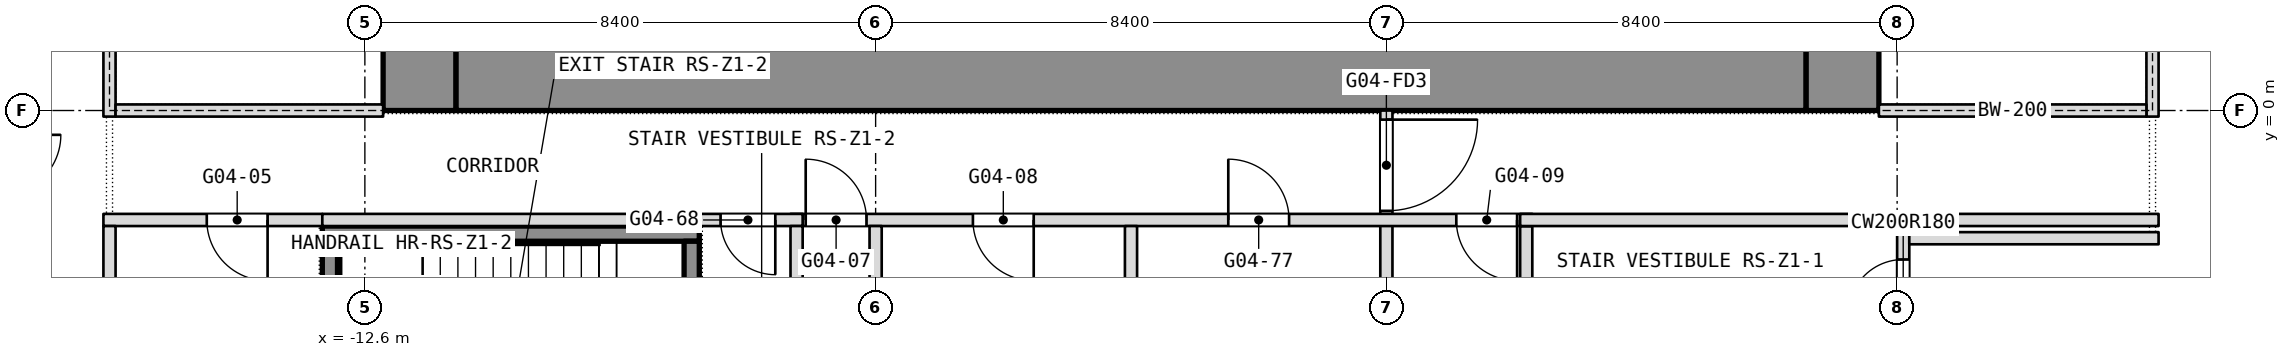
"""IFC4 building model, lengths in metres.
Left out: names, types, materials, properties, quantities, classifications, styles, units other than length and angle.
Written with IfcOpenShell. Run it as: python <this file> out.ifc"""

import sys

from ifc_helpers import new_model, si_unit, direction, frame, frame_2d, origin, place, context, subcontext, project, spatial, rectangle, extrude, element, fill, save


model = new_model("IFC4")
c1 = context("Model", 3, precision=1e-05, world=origin(), true_north=direction((0.0, 1.0)))
c2 = subcontext(c1, "Body", "Model", "MODEL_VIEW")
j1 = project(units=[si_unit("LENGTHUNIT", "METRE"), si_unit("PLANEANGLEUNIT", "RADIAN")], contexts=[c1])
p1 = place(None, origin())
s1 = spatial("IfcSite", under=j1, at=p1, CompositionType="ELEMENT")
p2 = place(p1, origin())
s2 = spatial("IfcBuilding", under=s1, at=p2, CompositionType="ELEMENT")
p3 = place(p2, frame((0.0, 0.0, 58.1)))
s3 = spatial("IfcBuildingStorey", under=s2, at=p3, CompositionType="ELEMENT", Elevation=58.1)
p4 = place(p3, frame((11.7, 0.0, 0.0), z_axis=(0.0, 0.0, 1.0), x_axis=(0.0, 1.0, 0.0)))
e1 = element("IfcWall", 1, at=p4, inside=s3, PredefinedType="SHEAR", context=c2, shape_type="SweptSolid", body=[
    extrude(rectangle(XDim=16.8, YDim=1.2, at=frame_2d((8.4, 0.0))), origin(), (0.0, 0.0, 1.0), 3.6),
])
p5 = place(p4, frame((1.762, 0.0, 0.0)))
e2 = element("IfcOpeningElement", 2, at=p5, cuts=e1, PredefinedType="OPENING", context=c2, shape_type="SweptSolid", body=[
    extrude(rectangle(XDim=0.9, YDim=2.1, at=frame_2d((0.45, 1.05))), frame((0.0, 0.6, 0.0), z_axis=(0.0, -1.0, 0.0), x_axis=(1.0, 0.0, 0.0)), (0.0, 0.0, 1.0), 1.2),
])
p6 = place(p4, frame((4.387, 0.0, 0.0)))
e3 = element("IfcOpeningElement", 3, at=p6, cuts=e1, PredefinedType="OPENING", context=c2, shape_type="SweptSolid", body=[
    extrude(rectangle(XDim=0.9, YDim=2.1, at=frame_2d((0.45, 1.05))), frame((0.0, 0.6, 0.0), z_axis=(0.0, -1.0, 0.0), x_axis=(1.0, 0.0, 0.0)), (0.0, 0.0, 1.0), 1.2),
])
p7 = place(p4, frame((6.825, 0.0, 0.0)))
e4 = element("IfcOpeningElement", 4, at=p7, cuts=e1, PredefinedType="OPENING", context=c2, shape_type="SweptSolid", body=[
    extrude(rectangle(XDim=1.2, YDim=2.1, at=frame_2d((0.6, 1.05))), frame((0.0, 0.6, 0.0), z_axis=(0.0, -1.0, 0.0), x_axis=(1.0, 0.0, 0.0)), (0.0, 0.0, 1.0), 1.2),
])
p8 = place(p4, frame((14.137, 0.0, 0.0)))
e5 = element("IfcOpeningElement", 5, at=p8, cuts=e1, PredefinedType="OPENING", context=c2, shape_type="SweptSolid", body=[
    extrude(rectangle(XDim=0.9, YDim=2.1, at=frame_2d((0.45, 1.05))), frame((0.0, 0.6, 0.0), z_axis=(0.0, -1.0, 0.0), x_axis=(1.0, 0.0, 0.0)), (0.0, 0.0, 1.0), 1.2),
])
p9 = place(p4, frame((11.512, 0.0, 0.0)))
e6 = element("IfcOpeningElement", 6, at=p9, cuts=e1, PredefinedType="OPENING", context=c2, shape_type="SweptSolid", body=[
    extrude(rectangle(XDim=0.9, YDim=2.1, at=frame_2d((0.45, 1.05))), frame((0.0, 0.6, 0.0), z_axis=(0.0, -1.0, 0.0), x_axis=(1.0, 0.0, 0.0)), (0.0, 0.0, 1.0), 1.2),
])
p10 = place(p4, frame((8.775, 0.0, 0.0)))
e7 = element("IfcOpeningElement", 7, at=p10, cuts=e1, PredefinedType="OPENING", context=c2, shape_type="SweptSolid", body=[
    extrude(rectangle(XDim=1.2, YDim=2.1, at=frame_2d((0.6, 1.05))), frame((0.0, 0.6, 0.0), z_axis=(0.0, -1.0, 0.0), x_axis=(1.0, 0.0, 0.0)), (0.0, 0.0, 1.0), 1.2),
])
p11 = place(p3, frame((-11.7, 0.0, 0.0), z_axis=(0.0, 0.0, 1.0), x_axis=(0.0, 1.0, 0.0)))
e8 = element("IfcWall", 8, at=p11, inside=s3, PredefinedType="SHEAR", context=c2, shape_type="SweptSolid", body=[
    extrude(rectangle(XDim=16.8, YDim=1.2, at=frame_2d((8.4, 0.0))), origin(), (0.0, 0.0, 1.0), 3.6),
])
p12 = place(p11, frame((2.3, 0.0, 0.0)))
e9 = element("IfcOpeningElement", 9, at=p12, cuts=e8, PredefinedType="OPENING", context=c2, shape_type="SweptSolid", body=[
    extrude(rectangle(XDim=1.1, YDim=2.1, at=frame_2d((0.55, 1.05))), frame((0.0, 0.6, 0.0), z_axis=(0.0, -1.0, 0.0), x_axis=(1.0, 0.0, 0.0)), (0.0, 0.0, 1.0), 1.2),
])
p13 = place(p11, frame((4.85, 0.0, 0.0)))
e10 = element("IfcOpeningElement", 10, at=p13, cuts=e8, PredefinedType="OPENING", context=c2, shape_type="SweptSolid", body=[
    extrude(rectangle(XDim=1.1, YDim=2.1, at=frame_2d((0.55, 1.05))), frame((0.0, 0.6, 0.0), z_axis=(0.0, -1.0, 0.0), x_axis=(1.0, 0.0, 0.0)), (0.0, 0.0, 1.0), 1.2),
])
p14 = place(p11, frame((6.825, 0.0, 0.0)))
e11 = element("IfcOpeningElement", 11, at=p14, cuts=e8, PredefinedType="OPENING", context=c2, shape_type="SweptSolid", body=[
    extrude(rectangle(XDim=1.2, YDim=2.1, at=frame_2d((0.6, 1.05))), frame((0.0, 0.6, 0.0), z_axis=(0.0, -1.0, 0.0), x_axis=(1.0, 0.0, 0.0)), (0.0, 0.0, 1.0), 1.2),
])
p15 = place(p11, frame((13.4, 0.0, 0.0)))
e12 = element("IfcOpeningElement", 12, at=p15, cuts=e8, PredefinedType="OPENING", context=c2, shape_type="SweptSolid", body=[
    extrude(rectangle(XDim=1.1, YDim=2.1, at=frame_2d((0.55, 1.05))), frame((0.0, 0.6, 0.0), z_axis=(0.0, -1.0, 0.0), x_axis=(1.0, 0.0, 0.0)), (0.0, 0.0, 1.0), 1.2),
])
p16 = place(p11, frame((10.85, 0.0, 0.0)))
e13 = element("IfcOpeningElement", 13, at=p16, cuts=e8, PredefinedType="OPENING", context=c2, shape_type="SweptSolid", body=[
    extrude(rectangle(XDim=1.1, YDim=2.1, at=frame_2d((0.55, 1.05))), frame((0.0, 0.6, 0.0), z_axis=(0.0, -1.0, 0.0), x_axis=(1.0, 0.0, 0.0)), (0.0, 0.0, 1.0), 1.2),
])
p17 = place(p11, frame((8.775, 0.0, 0.0)))
e14 = element("IfcOpeningElement", 14, at=p17, cuts=e8, PredefinedType="OPENING", context=c2, shape_type="SweptSolid", body=[
    extrude(rectangle(XDim=1.2, YDim=2.1, at=frame_2d((0.6, 1.05))), frame((0.0, 0.6, 0.0), z_axis=(0.0, -1.0, 0.0), x_axis=(1.0, 0.0, 0.0)), (0.0, 0.0, 1.0), 1.2),
])
p18 = place(p3, frame((-11.1, 0.6, 0.0), z_axis=(0.0, 0.0, 1.0), x_axis=(1.0, 0.0, 0.0)))
e15 = element("IfcWall", 15, at=p18, inside=s3, PredefinedType="SHEAR", context=c2, shape_type="SweptSolid", body=[
    extrude(rectangle(XDim=22.2, YDim=1.2, at=frame_2d((11.1, 0.0))), origin(), (0.0, 0.0, 1.0), 3.6),
])
p19 = place(p3, frame((12.7, -3.7, 0.0), z_axis=(0.0, 0.0, 1.0), x_axis=(0.0, 1.0, 0.0)))
e16 = element("IfcWall", 16, at=p19, inside=s3, PredefinedType="PARTITIONING", context=c2, shape_type="SweptSolid", body=[
    extrude(rectangle(XDim=1.7, YDim=0.2, at=frame_2d((0.85, 0.0))), origin(), (0.0, 0.0, 1.0), 3.34),
])
p20 = place(p19, frame((0.35, 0.0, 0.0)))
e17 = element("IfcOpeningElement", 17, at=p20, cuts=e16, PredefinedType="OPENING", context=c2, shape_type="SweptSolid", body=[
    extrude(rectangle(XDim=0.9, YDim=2.1, at=frame_2d((0.45, 1.05))), frame((0.0, 0.1, 0.0), z_axis=(0.0, -1.0, 0.0), x_axis=(1.0, 0.0, 0.0)), (0.0, 0.0, 1.0), 0.2),
])
p21 = place(p3, frame((6.5, -3.7, 0.0), z_axis=(0.0, 0.0, 1.0), x_axis=(0.0, 1.0, 0.0)))
e18 = element("IfcWall", 18, at=p21, inside=s3, PredefinedType="PARTITIONING", context=c2, shape_type="SweptSolid", body=[
    extrude(rectangle(XDim=1.8, YDim=0.2, at=frame_2d((0.9, 0.0))), origin(), (0.0, 0.0, 1.0), 3.34),
])
p22 = place(p3, frame((4.2, -12.7, 0.0), z_axis=(0.0, 0.0, 1.0), x_axis=(0.0, 1.0, 0.0)))
e19 = element("IfcWall", 19, at=p22, inside=s3, PredefinedType="PARTITIONING", context=c2, shape_type="SweptSolid", body=[
    extrude(rectangle(XDim=12.7, YDim=0.2, at=frame_2d((6.35, 0.0))), origin(), (0.0, 0.0, 1.0), 3.34),
])
p23 = place(p22, frame((11.05, 0.0, 0.0)))
e20 = element("IfcOpeningElement", 20, at=p23, cuts=e19, PredefinedType="OPENING", context=c2, shape_type="SweptSolid", body=[
    extrude(rectangle(XDim=1.5, YDim=2.1, at=frame_2d((0.75, 1.05))), frame((0.0, 0.1, 0.0), z_axis=(0.0, -1.0, 0.0), x_axis=(1.0, 0.0, 0.0)), (0.0, 0.0, 1.0), 0.2),
])
p24 = place(p22, frame((0.25, 0.0, 0.0)))
e21 = element("IfcOpeningElement", 21, at=p24, cuts=e19, PredefinedType="OPENING", context=c2, shape_type="SweptSolid", body=[
    extrude(rectangle(XDim=1.5, YDim=2.1, at=frame_2d((0.75, 1.05))), frame((0.0, 0.1, 0.0), z_axis=(0.0, -1.0, 0.0), x_axis=(1.0, 0.0, 0.0)), (0.0, 0.0, 1.0), 0.2),
])
p25 = place(p3, frame((12.8, -2.1, 0.0), z_axis=(0.0, 0.0, 1.0), x_axis=(1.0, 0.0, 0.0)))
e22 = element("IfcWall", 22, at=p25, inside=s3, PredefinedType="PARTITIONING", context=c2, shape_type="SweptSolid", body=[
    extrude(rectangle(XDim=4.1, YDim=0.2, at=frame_2d((2.05, 0.0))), origin(), (0.0, 0.0, 1.0), 3.34),
])
p26 = place(p3, frame((-16.9, -1.8, 0.0), z_axis=(0.0, 0.0, 1.0), x_axis=(1.0, 0.0, 0.0)))
e23 = element("IfcWall", 23, at=p26, inside=s3, PredefinedType="PARTITIONING", context=c2, shape_type="SweptSolid", body=[
    extrude(rectangle(XDim=3.6, YDim=0.2, at=frame_2d((1.8, 0.0))), origin(), (0.0, 0.0, 1.0), 3.34),
])
p27 = place(p26, frame((1.7, 0.0, 0.0)))
e24 = element("IfcOpeningElement", 24, at=p27, cuts=e23, PredefinedType="OPENING", context=c2, shape_type="SweptSolid", body=[
    extrude(rectangle(XDim=1.0, YDim=2.1, at=frame_2d((0.5, 1.05))), frame((0.0, 0.1, 0.0), z_axis=(0.0, -1.0, 0.0), x_axis=(1.0, 0.0, 0.0)), (0.0, 0.0, 1.0), 0.2),
])
p28 = place(p3, frame((-5.6, -1.8, 0.0), z_axis=(0.0, 0.0, 1.0), x_axis=(1.0, 0.0, 0.0)))
e25 = element("IfcWall", 25, at=p28, inside=s3, PredefinedType="PARTITIONING", context=c2, shape_type="SweptSolid", body=[
    extrude(rectangle(XDim=12.2, YDim=0.2, at=frame_2d((6.1, 0.0))), origin(), (0.0, 0.0, 1.0), 3.34),
])
p29 = place(p28, frame((0.25, 0.0, 0.0)))
e26 = element("IfcOpeningElement", 26, at=p29, cuts=e25, PredefinedType="OPENING", context=c2, shape_type="SweptSolid", body=[
    extrude(rectangle(XDim=1.0, YDim=2.1, at=frame_2d((0.5, 1.05))), frame((0.0, 0.1, 0.0), z_axis=(0.0, -1.0, 0.0), x_axis=(1.0, 0.0, 0.0)), (0.0, 0.0, 1.0), 0.2),
])
p30 = place(p28, frame((3.0, 0.0, 0.0)))
e27 = element("IfcOpeningElement", 27, at=p30, cuts=e25, PredefinedType="OPENING", context=c2, shape_type="SweptSolid", body=[
    extrude(rectangle(XDim=1.0, YDim=2.1, at=frame_2d((0.5, 1.05))), frame((0.0, 0.1, 0.0), z_axis=(0.0, -1.0, 0.0), x_axis=(1.0, 0.0, 0.0)), (0.0, 0.0, 1.0), 0.2),
])
p31 = place(p28, frame((10.95, 0.0, 0.0)))
e28 = element("IfcOpeningElement", 28, at=p31, cuts=e25, PredefinedType="OPENING", context=c2, shape_type="SweptSolid", body=[
    extrude(rectangle(XDim=1.0, YDim=2.1, at=frame_2d((0.5, 1.05))), frame((0.0, 0.1, 0.0), z_axis=(0.0, -1.0, 0.0), x_axis=(1.0, 0.0, 0.0)), (0.0, 0.0, 1.0), 0.2),
])
p32 = place(p28, frame((7.2, 0.0, 0.0)))
e29 = element("IfcOpeningElement", 29, at=p32, cuts=e25, PredefinedType="OPENING", context=c2, shape_type="SweptSolid", body=[
    extrude(rectangle(XDim=1.0, YDim=2.1, at=frame_2d((0.5, 1.05))), frame((0.0, 0.1, 0.0), z_axis=(0.0, -1.0, 0.0), x_axis=(1.0, 0.0, 0.0)), (0.0, 0.0, 1.0), 0.2),
])
p33 = place(p3, frame((-13.3, -1.8, 0.0), z_axis=(0.0, 0.0, 1.0), x_axis=(1.0, 0.0, 0.0)))
e30 = element("IfcWall", 30, at=p33, inside=s3, PredefinedType="PARTITIONING", context=c2, shape_type="SweptSolid", body=[
    extrude(rectangle(XDim=7.9, YDim=0.2, at=frame_2d((3.95, 0.0))), origin(), (0.0, 0.0, 1.0), 3.34),
])
p34 = place(p33, frame((6.55, 0.0, 0.0)))
e31 = element("IfcOpeningElement", 31, at=p34, cuts=e30, PredefinedType="OPENING", context=c2, shape_type="SweptSolid", body=[
    extrude(rectangle(XDim=0.9, YDim=2.1, at=frame_2d((0.45, 1.05))), frame((0.0, 0.1, 0.0), z_axis=(0.0, -1.0, 0.0), x_axis=(1.0, 0.0, 0.0)), (0.0, 0.0, 1.0), 0.2),
])
p35 = place(p3, frame((6.4, -1.8, 0.0), z_axis=(0.0, 0.0, 1.0), x_axis=(1.0, 0.0, 0.0)))
e32 = element("IfcWall", 32, at=p35, inside=s3, PredefinedType="PARTITIONING", context=c2, shape_type="SweptSolid", body=[
    extrude(rectangle(XDim=10.5, YDim=0.2, at=frame_2d((5.25, 0.0))), origin(), (0.0, 0.0, 1.0), 3.34),
])
for number, where, z_axis, x_axis in (
    (33, (0.0, -10.7, 0.0), (0.0, 0.0, 1.0), (0.0, 1.0, 0.0)),
    (34, (-4.2, -10.7, 0.0), (0.0, 0.0, 1.0), (0.0, 1.0, 0.0)),
):
    element("IfcWall", number, at=place(p3, frame(where, z_axis=z_axis, x_axis=x_axis)), inside=s3, PredefinedType="PARTITIONING", context=c2, shape_type="SweptSolid", body=[
        extrude(rectangle(XDim=8.8, YDim=0.2, at=frame_2d((4.4, 0.0))), origin(), (0.0, 0.0, 1.0), 3.34),
    ])
p36 = place(p3, frame((-5.5, -5.2, 0.0), z_axis=(0.0, 0.0, 1.0), x_axis=(0.0, 1.0, 0.0)))
e35 = element("IfcWall", 35, at=p36, inside=s3, PredefinedType="PARTITIONING", context=c2, shape_type="SweptSolid", body=[
    extrude(rectangle(XDim=3.3, YDim=0.2, at=frame_2d((1.65, 0.0))), origin(), (0.0, 0.0, 1.0), 3.34),
])
p37 = place(p3, frame((-16.8, -10.9, 0.0), z_axis=(0.0, 0.0, 1.0), x_axis=(0.0, 1.0, 0.0)))
e36 = element("IfcWall", 36, at=p37, inside=s3, PredefinedType="PARTITIONING", context=c2, shape_type="SweptSolid", body=[
    extrude(rectangle(XDim=9.0, YDim=0.2, at=frame_2d((4.5, 0.0))), origin(), (0.0, 0.0, 1.0), 3.34),
])
p38 = place(p3, frame((-16.8, -0.1, 0.0), z_axis=(0.0, 0.0, 1.0), x_axis=(0.0, 1.0, 0.0)))
e37 = element("IfcWall", 37, at=p38, inside=s3, PredefinedType="PARTITIONING", context=c2, shape_type="SweptSolid", body=[
    extrude(rectangle(XDim=17.0, YDim=0.2, at=frame_2d((8.5, 0.0))), origin(), (0.0, 0.0, 1.0), 3.34),
])
p39 = place(p38, frame((2.2, 0.0, 0.0)))
e38 = element("IfcOpeningElement", 38, at=p39, cuts=e37, PredefinedType="OPENING", context=c2, shape_type="SweptSolid", body=[
    extrude(rectangle(XDim=1.8, YDim=2.1, at=frame_2d((0.9, 1.05))), frame((0.0, 0.1, 0.0), z_axis=(0.0, -1.0, 0.0), x_axis=(1.0, 0.0, 0.0)), (0.0, 0.0, 1.0), 0.2),
])
p40 = place(p38, frame((7.2, 0.0, 0.0)))
e39 = element("IfcOpeningElement", 39, at=p40, cuts=e37, PredefinedType="OPENING", context=c2, shape_type="SweptSolid", body=[
    extrude(rectangle(XDim=1.8, YDim=2.1, at=frame_2d((0.9, 1.05))), frame((0.0, 0.1, 0.0), z_axis=(0.0, -1.0, 0.0), x_axis=(1.0, 0.0, 0.0)), (0.0, 0.0, 1.0), 0.2),
])
p41 = place(p3, frame((-16.7, 0.0, 0.0), z_axis=(0.0, 0.0, 1.0), x_axis=(1.0, 0.0, 0.0)))
e40 = element("IfcWall", 40, at=p41, inside=s3, PredefinedType="PARTITIONING", context=c2, shape_type="SweptSolid", body=[
    extrude(rectangle(XDim=4.4, YDim=0.2, at=frame_2d((2.2, 0.0))), origin(), (0.0, 0.0, 1.0), 2.84),
])
p42 = place(p3, frame((16.8, -0.1, 0.0), z_axis=(0.0, 0.0, 1.0), x_axis=(0.0, 1.0, 0.0)))
e41 = element("IfcWall", 41, at=p42, inside=s3, PredefinedType="PARTITIONING", context=c2, shape_type="SweptSolid", body=[
    extrude(rectangle(XDim=17.0, YDim=0.2, at=frame_2d((8.5, 0.0))), origin(), (0.0, 0.0, 1.0), 3.34),
])
p43 = place(p42, frame((2.2, 0.0, 0.0)))
e42 = element("IfcOpeningElement", 42, at=p43, cuts=e41, PredefinedType="OPENING", context=c2, shape_type="SweptSolid", body=[
    extrude(rectangle(XDim=1.8, YDim=2.1, at=frame_2d((0.9, 1.05))), frame((0.0, 0.1, 0.0), z_axis=(0.0, -1.0, 0.0), x_axis=(1.0, 0.0, 0.0)), (0.0, 0.0, 1.0), 0.2),
])
p44 = place(p42, frame((13.0, 0.0, 0.0)))
e43 = element("IfcOpeningElement", 43, at=p44, cuts=e41, PredefinedType="OPENING", context=c2, shape_type="SweptSolid", body=[
    extrude(rectangle(XDim=1.8, YDim=2.1, at=frame_2d((0.9, 1.05))), frame((0.0, 0.1, 0.0), z_axis=(0.0, -1.0, 0.0), x_axis=(1.0, 0.0, 0.0)), (0.0, 0.0, 1.0), 0.2),
])
p45 = place(p3, frame((12.3, 0.0, 0.0), z_axis=(0.0, 0.0, 1.0), x_axis=(1.0, 0.0, 0.0)))
e44 = element("IfcWall", 44, at=p45, inside=s3, PredefinedType="PARTITIONING", context=c2, shape_type="SweptSolid", body=[
    extrude(rectangle(XDim=4.4, YDim=0.2, at=frame_2d((2.2, 0.0))), origin(), (0.0, 0.0, 1.0), 2.84),
])
p46 = place(p3, frame((-13.3, -2.025, 0.1), z_axis=(0.0, 0.0, 1.0), x_axis=(1.0, 0.0, 0.0)))
e45 = element("IfcWall", 45, at=p46, inside=s3, PredefinedType="SHEAR", context=c2, shape_type="SweptSolid", body=[
    extrude(rectangle(XDim=6.2, YDim=0.25, at=frame_2d((3.1, 0.0))), origin(), (0.0, 0.0, 1.0), 3.6),
])
p47 = place(p3, frame((-13.175, -5.05, 0.1), z_axis=(0.0, 0.0, 1.0), x_axis=(0.0, 1.0, 0.0)))
e46 = element("IfcWall", 46, at=p47, inside=s3, PredefinedType="SHEAR", context=c2, shape_type="SweptSolid", body=[
    extrude(rectangle(XDim=2.9, YDim=0.25, at=frame_2d((1.45, 0.0))), origin(), (0.0, 0.0, 1.0), 3.6),
])
p48 = place(p3, frame((-7.225, -5.05, 0.1), z_axis=(0.0, 0.0, 1.0), x_axis=(0.0, 1.0, 0.0)))
e47 = element("IfcWall", 47, at=p48, inside=s3, PredefinedType="SHEAR", context=c2, shape_type="SweptSolid", body=[
    extrude(rectangle(XDim=2.9, YDim=0.25, at=frame_2d((1.45, 0.0))), origin(), (0.0, 0.0, 1.0), 3.6),
])
p49 = place(p48, frame((0.95, 0.0, 0.0)))
e48 = element("IfcOpeningElement", 48, at=p49, cuts=e47, PredefinedType="OPENING", context=c2, shape_type="SweptSolid", body=[
    extrude(rectangle(XDim=1.0, YDim=2.1, at=frame_2d((0.5, 1.05))), frame((0.0, 0.125, 0.0), z_axis=(0.0, -1.0, 0.0), x_axis=(1.0, 0.0, 0.0)), (0.0, 0.0, 1.0), 0.25),
])
p50 = place(p20, origin())
e49 = element("IfcDoor", 49, at=p50, inside=s3, OperationType="SINGLE_SWING_RIGHT", PredefinedType="DOOR", context=c2, shape_type="SweptSolid", body=[
    extrude(rectangle(XDim=0.9, YDim=2.1, at=frame_2d((0.45, 1.05))), frame((0.0, 0.025, 0.0), z_axis=(0.0, -1.0, 0.0), x_axis=(1.0, 0.0, 0.0)), (0.0, 0.0, 1.0), 0.05),
])
fill(e17, e49)
p51 = place(p27, origin())
e50 = element("IfcDoor", 50, at=p51, inside=s3, OperationType="SINGLE_SWING_RIGHT", PredefinedType="DOOR", context=c2, shape_type="SweptSolid", body=[
    extrude(rectangle(XDim=1.0, YDim=2.1, at=frame_2d((0.5, 1.05))), frame((0.0, 0.025, 0.0), z_axis=(0.0, -1.0, 0.0), x_axis=(1.0, 0.0, 0.0)), (0.0, 0.0, 1.0), 0.05),
])
fill(e24, e50)
p52 = place(p29, origin())
e51 = element("IfcDoor", 51, at=p52, inside=s3, OperationType="SINGLE_SWING_RIGHT", PredefinedType="DOOR", context=c2, shape_type="SweptSolid", body=[
    extrude(rectangle(XDim=1.0, YDim=2.1, at=frame_2d((0.5, 1.05))), frame((0.0, 0.025, 0.0), z_axis=(0.0, -1.0, 0.0), x_axis=(1.0, 0.0, 0.0)), (0.0, 0.0, 1.0), 0.05),
])
fill(e26, e51)
p53 = place(p30, origin())
e52 = element("IfcDoor", 52, at=p53, inside=s3, OperationType="SINGLE_SWING_LEFT", PredefinedType="DOOR", context=c2, shape_type="SweptSolid", body=[
    extrude(rectangle(XDim=1.0, YDim=2.1, at=frame_2d((0.5, 1.05))), frame((0.0, 0.025, 0.0), z_axis=(0.0, -1.0, 0.0), x_axis=(1.0, 0.0, 0.0)), (0.0, 0.0, 1.0), 0.05),
])
fill(e27, e52)
p54 = place(p31, origin())
e53 = element("IfcDoor", 53, at=p54, inside=s3, OperationType="SINGLE_SWING_RIGHT", PredefinedType="DOOR", context=c2, shape_type="SweptSolid", body=[
    extrude(rectangle(XDim=1.0, YDim=2.1, at=frame_2d((0.5, 1.05))), frame((0.0, 0.025, 0.0), z_axis=(0.0, -1.0, 0.0), x_axis=(1.0, 0.0, 0.0)), (0.0, 0.0, 1.0), 0.05),
])
fill(e28, e53)
p55 = place(p32, origin())
e54 = element("IfcDoor", 54, at=p55, inside=s3, OperationType="SINGLE_SWING_RIGHT", PredefinedType="DOOR", context=c2, shape_type="SweptSolid", body=[
    extrude(rectangle(XDim=1.0, YDim=2.1, at=frame_2d((0.5, 1.05))), frame((0.0, 0.025, 0.0), z_axis=(0.0, -1.0, 0.0), x_axis=(1.0, 0.0, 0.0)), (0.0, 0.0, 1.0), 0.05),
])
fill(e29, e54)
p56 = place(p34, origin())
e55 = element("IfcDoor", 55, at=p56, inside=s3, OperationType="SINGLE_SWING_LEFT", PredefinedType="DOOR", context=c2, shape_type="SweptSolid", body=[
    extrude(rectangle(XDim=0.9, YDim=2.1, at=frame_2d((0.45, 1.05))), frame((0.0, 0.025, 0.0), z_axis=(0.0, -1.0, 0.0), x_axis=(1.0, 0.0, 0.0)), (0.0, 0.0, 1.0), 0.05),
])
fill(e31, e55)
p57 = place(p23, origin())
e56 = element("IfcDoor", 56, at=p57, inside=s3, OperationType="DOUBLE_DOOR_DOUBLE_SWING", PredefinedType="DOOR", context=c2, shape_type="SweptSolid", body=[
    extrude(rectangle(XDim=1.5, YDim=2.1, at=frame_2d((0.75, 1.05))), frame((0.0, 0.025, 0.0), z_axis=(0.0, -1.0, 0.0), x_axis=(1.0, 0.0, 0.0)), (0.0, 0.0, 1.0), 0.05),
])
fill(e20, e56)
save(model, sys.argv[1])
